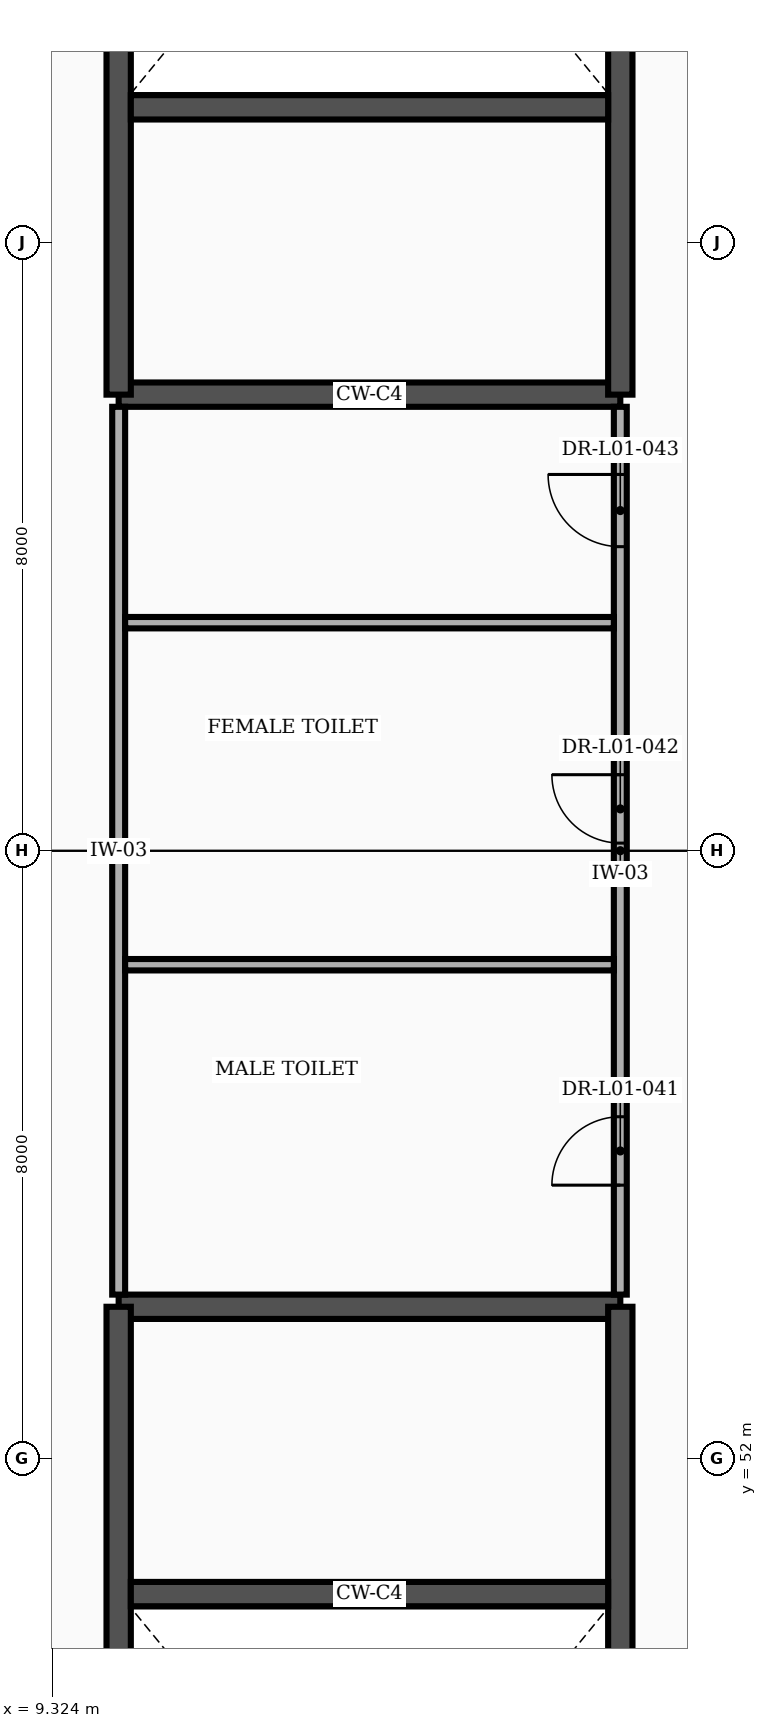
"""IFC4 building model, lengths in metres.
Left out: names, types, materials, properties, quantities, classifications, styles, units other than length and angle.
Written with IfcOpenShell. Run it as: python <this file> out.ifc"""

import sys

from ifc_helpers import new_model, si_unit, direction, frame, frame_2d, origin, place, context, subcontext, project, spatial, rectangle, extrude, element, fill, save


model = new_model("IFC4")
c1 = context("Model", 3, precision=1e-05, world=origin(), true_north=direction((0.0, 1.0)))
c2 = subcontext(c1, "Body", "Model", "MODEL_VIEW")
j1 = project(units=[si_unit("LENGTHUNIT", "METRE"), si_unit("PLANEANGLEUNIT", "RADIAN")], contexts=[c1])
p1 = place(None, origin())
s1 = spatial("IfcSite", under=j1, at=p1, CompositionType="ELEMENT")
p2 = place(p1, origin())
s2 = spatial("IfcBuilding", under=s1, at=p2, CompositionType="ELEMENT")
p3 = place(p2, frame((0.0, 0.0, 6.0)))
s3 = spatial("IfcBuildingStorey", under=s2, at=p3, CompositionType="ELEMENT", Elevation=6.0)
p4 = place(p3, frame((10.2, 54.0, 0.0), z_axis=(0.0, 0.0, 1.0), x_axis=(1.0, 0.0, 0.0)))
e1 = element("IfcWall", 1, at=p4, inside=s3, PredefinedType="SHEAR", context=c2, shape_type="SweptSolid", body=[
    extrude(rectangle(XDim=6.6, YDim=0.32, at=frame_2d((3.3, 0.0))), origin(), (0.0, 0.0, 1.0), 5.15),
])
p5 = place(p3, frame((10.2, 39.4, 0.0), z_axis=(0.0, 0.0, 1.0), x_axis=(0.0, 1.0, 0.0)))
e2 = element("IfcWall", 2, at=p5, inside=s3, PredefinedType="SHEAR", context=c2, shape_type="SweptSolid", body=[
    extrude(rectangle(XDim=14.6, YDim=0.32, at=frame_2d((7.3, 0.0))), origin(), (0.0, 0.0, 1.0), 5.15),
])
p6 = place(p3, frame((16.8, 39.4, 0.0), z_axis=(0.0, 0.0, 1.0), x_axis=(0.0, 1.0, 0.0)))
e3 = element("IfcWall", 3, at=p6, inside=s3, PredefinedType="SHEAR", context=c2, shape_type="SweptSolid", body=[
    extrude(rectangle(XDim=14.6, YDim=0.32, at=frame_2d((7.3, 0.0))), origin(), (0.0, 0.0, 1.0), 5.15),
])
p7 = place(p6, frame((0.55, 0.0, 0.0)))
e4 = element("IfcOpeningElement", 4, at=p7, cuts=e3, PredefinedType="OPENING", context=c2, shape_type="SweptSolid", body=[
    extrude(rectangle(XDim=2.4, YDim=2.25, at=frame_2d((1.2, 1.125))), frame((0.0, 0.172, 0.0), z_axis=(0.0, -1.0, 0.0), x_axis=(1.0, 0.0, 0.0)), (0.0, 0.0, 1.0), 0.344),
])
p8 = place(p3, frame((10.36, 50.22, 0.0), z_axis=(0.0, 0.0, 1.0), x_axis=(1.0, 0.0, 0.0)))
e5 = element("IfcWall", 5, at=p8, inside=s3, PredefinedType="SHEAR", context=c2, shape_type="SweptSolid", body=[
    extrude(rectangle(XDim=6.28, YDim=0.32, at=frame_2d((3.14, 0.0))), origin(), (0.0, 0.0, 1.0), 5.15),
])
p9 = place(p3, frame((10.2, 66.0, 0.0), z_axis=(0.0, 0.0, 1.0), x_axis=(1.0, 0.0, 0.0)))
e6 = element("IfcWall", 6, at=p9, inside=s3, PredefinedType="SHEAR", context=c2, shape_type="SweptSolid", body=[
    extrude(rectangle(XDim=6.6, YDim=0.32, at=frame_2d((3.3, 0.0))), origin(), (0.0, 0.0, 1.0), 5.15),
])
p10 = place(p3, frame((10.2, 66.0, 0.0), z_axis=(0.0, 0.0, 1.0), x_axis=(0.0, 1.0, 0.0)))
e7 = element("IfcWall", 7, at=p10, inside=s3, PredefinedType="SHEAR", context=c2, shape_type="SweptSolid", body=[
    extrude(rectangle(XDim=14.6, YDim=0.32, at=frame_2d((7.3, 0.0))), origin(), (0.0, 0.0, 1.0), 5.15),
])
p11 = place(p3, frame((16.8, 66.0, 0.0), z_axis=(0.0, 0.0, 1.0), x_axis=(0.0, 1.0, 0.0)))
e8 = element("IfcWall", 8, at=p11, inside=s3, PredefinedType="SHEAR", context=c2, shape_type="SweptSolid", body=[
    extrude(rectangle(XDim=14.6, YDim=0.32, at=frame_2d((7.3, 0.0))), origin(), (0.0, 0.0, 1.0), 5.15),
])
p12 = place(p11, frame((11.65, 0.0, 0.0)))
e9 = element("IfcOpeningElement", 9, at=p12, cuts=e8, PredefinedType="OPENING", context=c2, shape_type="SweptSolid", body=[
    extrude(rectangle(XDim=2.4, YDim=2.25, at=frame_2d((1.2, 1.125))), frame((0.0, 0.172, 0.0), z_axis=(0.0, -1.0, 0.0), x_axis=(1.0, 0.0, 0.0)), (0.0, 0.0, 1.0), 0.344),
])
p13 = place(p3, frame((10.36, 69.78, 0.0), z_axis=(0.0, 0.0, 1.0), x_axis=(1.0, 0.0, 0.0)))
e10 = element("IfcWall", 10, at=p13, inside=s3, PredefinedType="SHEAR", context=c2, shape_type="SweptSolid", body=[
    extrude(rectangle(XDim=6.28, YDim=0.32, at=frame_2d((3.14, 0.0))), origin(), (0.0, 0.0, 1.0), 5.15),
])
p14 = place(p3, frame((10.2, 54.16, 0.0), z_axis=(0.0, 0.0, 1.0), x_axis=(0.0, 1.0, 0.0)))
e11 = element("IfcWall", 11, at=p14, inside=s3, PredefinedType="PARTITIONING", context=c2, shape_type="SweptSolid", body=[
    extrude(rectangle(XDim=11.68, YDim=0.17, at=frame_2d((5.84, 0.0))), origin(), (0.0, 0.0, 1.0), 5.15),
])
p15 = place(p3, frame((16.8, 54.16, 0.0), z_axis=(0.0, 0.0, 1.0), x_axis=(0.0, 1.0, 0.0)))
e12 = element("IfcWall", 12, at=p15, inside=s3, PredefinedType="PARTITIONING", context=c2, shape_type="SweptSolid", body=[
    extrude(rectangle(XDim=11.68, YDim=0.17, at=frame_2d((5.84, 0.0))), origin(), (0.0, 0.0, 1.0), 5.15),
])
p16 = place(p15, frame((1.44, 0.0, 0.0)))
e13 = element("IfcOpeningElement", 13, at=p16, cuts=e12, PredefinedType="OPENING", context=c2, shape_type="SweptSolid", body=[
    extrude(rectangle(XDim=0.9, YDim=2.1, at=frame_2d((0.45, 1.05))), frame((0.0, 0.097, 0.0), z_axis=(0.0, -1.0, 0.0), x_axis=(1.0, 0.0, 0.0)), (0.0, 0.0, 1.0), 0.194),
])
p17 = place(p15, frame((5.94, 0.0, 0.0)))
e14 = element("IfcOpeningElement", 14, at=p17, cuts=e12, PredefinedType="OPENING", context=c2, shape_type="SweptSolid", body=[
    extrude(rectangle(XDim=0.9, YDim=2.1, at=frame_2d((0.45, 1.05))), frame((0.0, 0.097, 0.0), z_axis=(0.0, -1.0, 0.0), x_axis=(1.0, 0.0, 0.0)), (0.0, 0.0, 1.0), 0.194),
])
p18 = place(p15, frame((9.84, 0.0, 0.0)))
e15 = element("IfcOpeningElement", 15, at=p18, cuts=e12, PredefinedType="OPENING", context=c2, shape_type="SweptSolid", body=[
    extrude(rectangle(XDim=0.95, YDim=2.1, at=frame_2d((0.475, 1.05))), frame((0.0, 0.097, 0.0), z_axis=(0.0, -1.0, 0.0), x_axis=(1.0, 0.0, 0.0)), (0.0, 0.0, 1.0), 0.194),
])
for number, where, z_axis, x_axis in (
    (16, (10.285, 58.5, 0.0), (0.0, 0.0, 1.0), (1.0, 0.0, 0.0)),
    (17, (10.285, 63.0, 0.0), (0.0, 0.0, 1.0), (1.0, 0.0, 0.0)),
):
    element("IfcWall", number, at=place(p3, frame(where, z_axis=z_axis, x_axis=x_axis)), inside=s3, PredefinedType="PARTITIONING", context=c2, shape_type="SweptSolid", body=[
        extrude(rectangle(XDim=6.43, YDim=0.15, at=frame_2d((3.215, 0.0))), origin(), (0.0, 0.0, 1.0), 5.15),
    ])
p19 = place(p16, origin())
e18 = element("IfcDoor", 18, at=p19, inside=s3, OperationType="SINGLE_SWING_LEFT", PredefinedType="DOOR", context=c2, shape_type="SweptSolid", body=[
    extrude(rectangle(XDim=0.9, YDim=2.1, at=frame_2d((0.45, 1.05))), frame((0.0, 0.025, 0.0), z_axis=(0.0, -1.0, 0.0), x_axis=(1.0, 0.0, 0.0)), (0.0, 0.0, 1.0), 0.05),
])
fill(e13, e18)
p20 = place(p17, origin())
e19 = element("IfcDoor", 19, at=p20, inside=s3, OperationType="SINGLE_SWING_RIGHT", PredefinedType="DOOR", context=c2, shape_type="SweptSolid", body=[
    extrude(rectangle(XDim=0.9, YDim=2.1, at=frame_2d((0.45, 1.05))), frame((0.0, 0.025, 0.0), z_axis=(0.0, -1.0, 0.0), x_axis=(1.0, 0.0, 0.0)), (0.0, 0.0, 1.0), 0.05),
])
fill(e14, e19)
p21 = place(p18, origin())
e20 = element("IfcDoor", 20, at=p21, inside=s3, OperationType="SINGLE_SWING_RIGHT", PredefinedType="DOOR", context=c2, shape_type="SweptSolid", body=[
    extrude(rectangle(XDim=0.95, YDim=2.1, at=frame_2d((0.475, 1.05))), frame((0.0, 0.025, 0.0), z_axis=(0.0, -1.0, 0.0), x_axis=(1.0, 0.0, 0.0)), (0.0, 0.0, 1.0), 0.05),
])
fill(e15, e20)
save(model, sys.argv[1])
